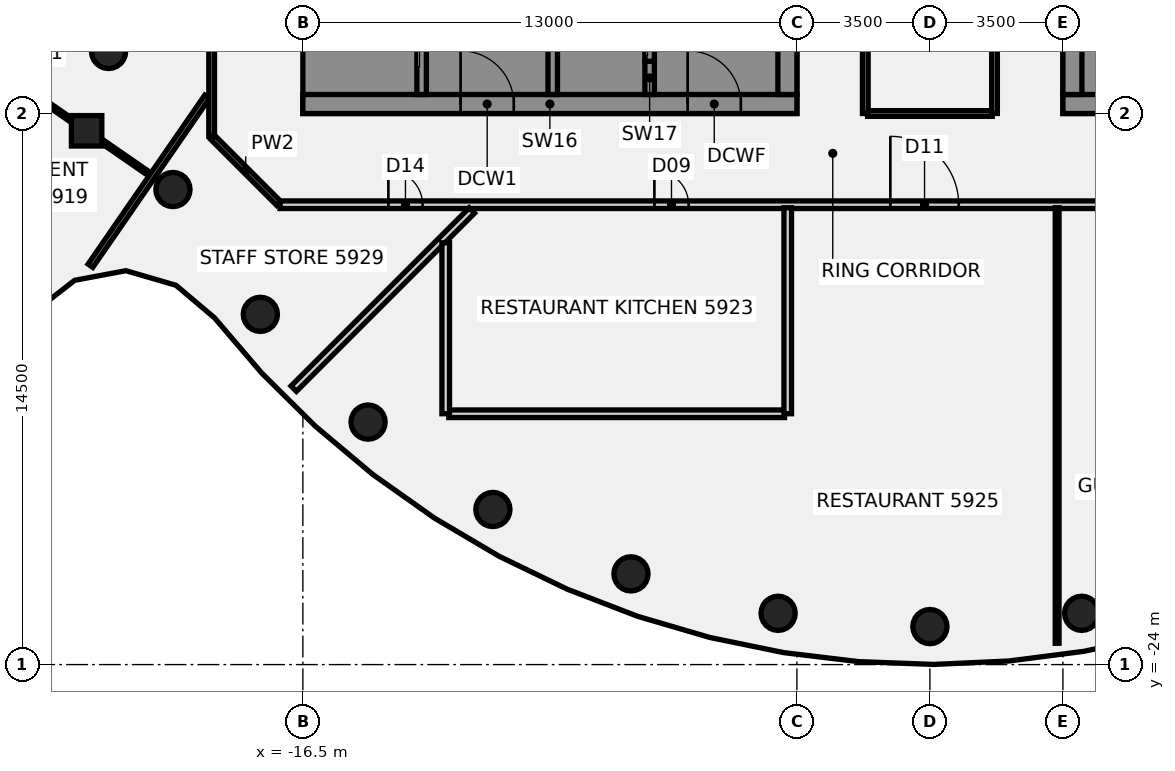
"""IFC4 building model, lengths in metres.
Left out: names, types, materials, properties, quantities, classifications, styles, units other than length and angle.
Written with IfcOpenShell. Run it as: python <this file> out.ifc"""

import sys

from ifc_helpers import new_model, si_unit, direction, frame, frame_2d, origin, origin_2d, place, context, subcontext, project, spatial, polyline, rectangle, circle, outline, extrude, element, fill, save


model = new_model("IFC4")
c1 = context("Model", 3, precision=1e-05, world=origin(), true_north=direction((0.0, 1.0)))
c2 = subcontext(c1, "Body", "Model", "MODEL_VIEW")
j1 = project(units=[si_unit("LENGTHUNIT", "METRE"), si_unit("PLANEANGLEUNIT", "RADIAN")], contexts=[c1])
p1 = place(None, origin())
s1 = spatial("IfcSite", under=j1, at=p1, CompositionType="ELEMENT")
p2 = place(p1, origin())
s2 = spatial("IfcBuilding", under=s1, at=p2, CompositionType="ELEMENT")
p3 = place(p2, frame((0.0, 0.0, 234.3)))
s3 = spatial("IfcBuildingStorey", under=s2, at=p3, CompositionType="ELEMENT", Elevation=234.3)
for number, where, z_axis, x_axis in (
    (1, (-21.613, -7.866, -0.14), (0.0, 0.0, 1.0), (1.0, 0.0, 0.0)),
    (2, (-19.919, -11.5, -0.14), (0.0, 0.0, 1.0), (1.0, 0.0, 0.0)),
    (3, (-17.619, -14.784, -0.14), (0.0, 0.0, 1.0), (1.0, 0.0, 0.0)),
    (4, (-14.784, -17.619, -0.14), (0.0, 0.0, 1.0), (1.0, 0.0, 0.0)),
    (5, (-11.5, -19.919, -0.14), (0.0, 0.0, 1.0), (1.0, 0.0, 0.0)),
    (6, (-7.866, -21.613, -0.14), (0.0, 0.0, 1.0), (1.0, 0.0, 0.0)),
    (7, (-3.994, -22.651, -0.14), (0.0, 0.0, 1.0), (1.0, 0.0, 0.0)),
    (8, (0.0, -23.0, -0.14), (0.0, 0.0, 1.0), (1.0, 0.0, 0.0)),
    (9, (3.994, -22.651, -0.14), (0.0, 0.0, 1.0), (1.0, 0.0, 0.0)),
):
    element("IfcColumn", number, at=place(p3, frame(where, z_axis=z_axis, x_axis=x_axis)), inside=s3, PredefinedType="COLUMN", context=c2, shape_type="SweptSolid", body=[
        extrude(circle(Radius=0.45, at=origin_2d()), origin(), (0.0, 0.0, 1.0), 3.6),
    ])
p4 = place(p3, frame((-22.19, -9.955, -0.139), z_axis=(0.050356763522, -0.000474424421, 0.998731180693), x_axis=(-0.822157981301, 0.5677282831, 0.041723498785)))
e10 = element("IfcColumn", 10, at=p4, inside=s3, PredefinedType="COLUMN", context=c2, shape_type="SweptSolid", body=[
    extrude(rectangle(XDim=0.8, YDim=0.8, at=origin_2d()), origin(), (0.0, 0.0, 1.0), 3.602),
])
p5 = place(p3, frame((-18.872, -10.128, 0.0), z_axis=(0.0, 0.0, 1.0), x_axis=(0.707106781187, -0.707106781187, 0.0)))
e11 = element("IfcWall", 11, at=p5, inside=s3, PredefinedType="PARTITIONING", context=c2, shape_type="SweptSolid", body=[
    extrude(rectangle(XDim=2.455, YDim=0.15, at=frame_2d((1.228, 0.0))), origin(), (0.0, 0.0, 1.0), 2.864),
])
p6 = place(p3, frame((-25.667, -7.555, 0.0), z_axis=(0.0, 0.0, 1.0), x_axis=(0.822953879719, -0.568108186753, 0.0)))
e12 = element("IfcWall", 12, at=p6, inside=s3, PredefinedType="PARTITIONING", context=c2, shape_type="SweptSolid", body=[
    extrude(rectangle(XDim=3.816, YDim=0.1, at=frame_2d((1.908, 0.0))), origin(), (0.0, 0.0, 1.0), 2.864),
])
p7 = place(p3, frame((-21.74, -10.266, 0.0), z_axis=(0.0, 0.0, 1.0), x_axis=(0.822970451854, -0.568084179832, 0.0)))
e13 = element("IfcWall", 13, at=p7, inside=s3, PredefinedType="PARTITIONING", context=c2, shape_type="SweptSolid", body=[
    extrude(rectangle(XDim=1.478, YDim=0.1, at=frame_2d((0.739, 0.0))), origin(), (0.0, 0.0, 1.0), 2.864),
])
p8 = place(p3, frame((-17.1, -11.9, 0.0), z_axis=(0.0, 0.0, 1.0), x_axis=(1.0, 0.0, 0.0)))
e14 = element("IfcWall", 14, at=p8, inside=s3, PredefinedType="PARTITIONING", context=c2, shape_type="SweptSolid", body=[
    extrude(rectangle(XDim=34.165, YDim=0.2, at=frame_2d((17.083, 0.0))), origin(), (0.0, 0.0, 1.0), 2.864),
])
p9 = place(p8, frame((9.85, 0.0, 0.0)))
e15 = element("IfcOpeningElement", 15, at=p9, cuts=e14, PredefinedType="OPENING", context=c2, shape_type="SweptSolid", body=[
    extrude(rectangle(XDim=0.9, YDim=2.1, at=frame_2d((0.45, 1.05))), frame((0.0, 0.11, 0.0), z_axis=(0.0, -1.0, 0.0), x_axis=(1.0, 0.0, 0.0)), (0.0, 0.0, 1.0), 0.22),
])
p10 = place(p8, frame((26.941, 0.0, 0.0)))
e16 = element("IfcOpeningElement", 16, at=p10, cuts=e14, PredefinedType="OPENING", context=c2, shape_type="SweptSolid", body=[
    extrude(rectangle(XDim=0.9, YDim=2.1, at=frame_2d((0.45, 1.05))), frame((0.0, 0.11, 0.0), z_axis=(0.0, -1.0, 0.0), x_axis=(1.0, 0.0, 0.0)), (0.0, 0.0, 1.0), 0.22),
])
p11 = place(p8, frame((16.059, 0.0, 0.0)))
e17 = element("IfcOpeningElement", 17, at=p11, cuts=e14, PredefinedType="OPENING", context=c2, shape_type="SweptSolid", body=[
    extrude(rectangle(XDim=1.8, YDim=2.1, at=frame_2d((0.9, 1.05))), frame((0.0, 0.11, 0.0), z_axis=(0.0, -1.0, 0.0), x_axis=(1.0, 0.0, 0.0)), (0.0, 0.0, 1.0), 0.22),
])
p12 = place(p8, frame((22.548, 0.0, 0.0)))
e18 = element("IfcOpeningElement", 18, at=p12, cuts=e14, PredefinedType="OPENING", context=c2, shape_type="SweptSolid", body=[
    extrude(rectangle(XDim=1.8, YDim=2.1, at=frame_2d((0.9, 1.05))), frame((0.0, 0.11, 0.0), z_axis=(0.0, -1.0, 0.0), x_axis=(1.0, 0.0, 0.0)), (0.0, 0.0, 1.0), 0.22),
])
p13 = place(p8, frame((31.7, 0.0, 0.0)))
e19 = element("IfcOpeningElement", 19, at=p13, cuts=e14, PredefinedType="OPENING", context=c2, shape_type="SweptSolid", body=[
    extrude(rectangle(XDim=0.9, YDim=2.1, at=frame_2d((0.45, 1.05))), frame((0.0, 0.11, 0.0), z_axis=(0.0, -1.0, 0.0), x_axis=(1.0, 0.0, 0.0)), (0.0, 0.0, 1.0), 0.22),
])
p14 = place(p8, frame((2.85, 0.0, 0.0)))
e20 = element("IfcOpeningElement", 20, at=p14, cuts=e14, PredefinedType="OPENING", context=c2, shape_type="SweptSolid", body=[
    extrude(rectangle(XDim=0.9, YDim=2.1, at=frame_2d((0.45, 1.05))), frame((0.0, 0.11, 0.0), z_axis=(0.0, -1.0, 0.0), x_axis=(1.0, 0.0, 0.0)), (0.0, 0.0, 1.0), 0.22),
])
p15 = place(p3, frame((-12.661, -17.4, 0.0), z_axis=(0.0, 0.0, 1.0), x_axis=(1.0, 0.0, 0.0)))
e21 = element("IfcWall", 21, at=p15, inside=s3, PredefinedType="PARTITIONING", context=c2, shape_type="SweptSolid", body=[
    extrude(rectangle(XDim=8.835, YDim=0.2, at=frame_2d((4.417, 0.0))), origin(), (0.0, 0.0, 1.0), 2.864),
])
p16 = place(p3, frame((-1.64, -9.5, 0.0), z_axis=(0.0, 0.0, 1.0), x_axis=(1.0, 0.0, 0.0)))
e22 = element("IfcWall", 22, at=p16, inside=s3, PredefinedType="PARTITIONING", context=c2, shape_type="SweptSolid", body=[
    extrude(rectangle(XDim=3.28, YDim=0.15, at=frame_2d((1.64, 0.0))), origin(), (0.0, 0.0, 1.0), 2.864),
])
p17 = place(p3, frame((-16.74, -16.74, 0.0), z_axis=(0.0, 0.0, 1.0), x_axis=(0.707106781187, 0.707106781187, 0.0)))
e23 = element("IfcWall", 23, at=p17, inside=s3, PredefinedType="PARTITIONING", context=c2, shape_type="SweptSolid", body=[
    extrude(rectangle(XDim=6.631, YDim=0.2, at=frame_2d((3.315, 0.0))), origin(), (0.0, 0.0, 1.0), 2.864),
])
p18 = place(p3, frame((-22.09, -13.505, 0.0), z_axis=(0.0, 0.0, 1.0), x_axis=(0.568201643827, 0.822889355838, 0.0)))
e24 = element("IfcWall", 24, at=p18, inside=s3, PredefinedType="PARTITIONING", context=c2, shape_type="SweptSolid", body=[
    extrude(rectangle(XDim=5.404, YDim=0.15, at=frame_2d((2.702, 0.0))), origin(), (0.0, 0.0, 1.0), 2.864),
])
p19 = place(p3, frame((-18.9, -10.1, 0.0), z_axis=(0.0, 0.0, 1.0), x_axis=(0.0, 1.0, 0.0)))
e25 = element("IfcWall", 25, at=p19, inside=s3, PredefinedType="PARTITIONING", context=c2, shape_type="SweptSolid", body=[
    extrude(rectangle(XDim=20.2, YDim=0.15, at=frame_2d((10.1, 0.0))), origin(), (0.0, 0.0, 1.0), 2.864),
])
p20 = place(p19, frame((13.124, 0.0, 0.0)))
e26 = element("IfcOpeningElement", 26, at=p20, cuts=e25, PredefinedType="OPENING", context=c2, shape_type="SweptSolid", body=[
    extrude(rectangle(XDim=1.8, YDim=2.1, at=frame_2d((0.9, 1.05))), frame((0.0, 0.085, 0.0), z_axis=(0.0, -1.0, 0.0), x_axis=(1.0, 0.0, 0.0)), (0.0, 0.0, 1.0), 0.17),
])
p21 = place(p19, frame((8.291, 0.0, 0.0)))
e27 = element("IfcOpeningElement", 27, at=p21, cuts=e25, PredefinedType="OPENING", context=c2, shape_type="SweptSolid", body=[
    extrude(rectangle(XDim=0.9, YDim=2.1, at=frame_2d((0.45, 1.05))), frame((0.0, 0.085, 0.0), z_axis=(0.0, -1.0, 0.0), x_axis=(1.0, 0.0, 0.0)), (0.0, 0.0, 1.0), 0.17),
])
p22 = place(p3, frame((-12.741, -17.4, 0.0), z_axis=(0.0, 0.0, 1.0), x_axis=(0.0, 1.0, 0.0)))
e28 = element("IfcWall", 28, at=p22, inside=s3, PredefinedType="PARTITIONING", context=c2, shape_type="SweptSolid", body=[
    extrude(rectangle(XDim=4.499, YDim=0.2, at=frame_2d((2.25, 0.0))), origin(), (0.0, 0.0, 1.0), 2.864),
])
p23 = place(p3, frame((-3.741, -17.4, 0.0), z_axis=(0.0, 0.0, 1.0), x_axis=(0.0, 1.0, 0.0)))
e29 = element("IfcWall", 29, at=p23, inside=s3, PredefinedType="PARTITIONING", context=c2, shape_type="SweptSolid", body=[
    extrude(rectangle(XDim=5.42, YDim=0.2, at=frame_2d((2.71, 0.0))), origin(), (0.0, 0.0, 1.0), 2.864),
])
p24 = place(p3, frame((-1.7, -9.5, 0.0), z_axis=(0.0, 0.0, 1.0), x_axis=(0.0, 1.0, 0.0)))
e30 = element("IfcWall", 30, at=p24, inside=s3, PredefinedType="PARTITIONING", context=c2, shape_type="SweptSolid", body=[
    extrude(rectangle(XDim=19.0, YDim=0.15, at=frame_2d((9.5, 0.0))), origin(), (0.0, 0.0, 1.0), 2.864),
])
p25 = place(p24, frame((6.3, 0.0, 0.0)))
e31 = element("IfcOpeningElement", 31, at=p25, cuts=e30, PredefinedType="OPENING", context=c2, shape_type="SweptSolid", body=[
    extrude(rectangle(XDim=1.8, YDim=2.1, at=frame_2d((0.9, 1.05))), frame((0.0, 0.085, 0.0), z_axis=(0.0, -1.0, 0.0), x_axis=(1.0, 0.0, 0.0)), (0.0, 0.0, 1.0), 0.17),
])
p26 = place(p24, frame((13.45, 0.0, 0.0)))
e32 = element("IfcOpeningElement", 32, at=p26, cuts=e30, PredefinedType="OPENING", context=c2, shape_type="SweptSolid", body=[
    extrude(rectangle(XDim=1.8, YDim=2.1, at=frame_2d((0.9, 1.05))), frame((0.0, 0.085, 0.0), z_axis=(0.0, -1.0, 0.0), x_axis=(1.0, 0.0, 0.0)), (0.0, 0.0, 1.0), 0.17),
])
p27 = place(p3, frame((1.7, -9.5, 0.0), z_axis=(0.0, 0.0, 1.0), x_axis=(0.0, 1.0, 0.0)))
e33 = element("IfcWall", 33, at=p27, inside=s3, PredefinedType="PARTITIONING", context=c2, shape_type="SweptSolid", body=[
    extrude(rectangle(XDim=19.0, YDim=0.15, at=frame_2d((9.5, 0.0))), origin(), (0.0, 0.0, 1.0), 2.864),
])
p28 = place(p3, frame((3.348, -23.439, 0.0), z_axis=(0.0, 0.0, 1.0), x_axis=(0.0, 1.0, 0.0)))
e34 = element("IfcWall", 34, at=p28, inside=s3, PredefinedType="PARTITIONING", context=c2, shape_type="SweptSolid", body=[
    extrude(rectangle(XDim=11.459, YDim=0.1, at=frame_2d((5.729, 0.0))), origin(), (0.0, 0.0, 1.0), 2.864),
])
p29 = place(p3, frame((-16.5, -9.25, 0.0), z_axis=(0.0, 0.0, 1.0), x_axis=(1.0, 0.0, 0.0)))
e35 = element("IfcWall", 35, at=p29, inside=s3, PredefinedType="SHEAR", context=c2, shape_type="SweptSolid", body=[
    extrude(rectangle(XDim=13.0, YDim=0.5, at=frame_2d((6.5, 0.0))), origin(), (0.0, 0.0, 1.0), 3.46),
])
p30 = place(p29, frame((4.15, 0.0, 0.0)))
e36 = element("IfcOpeningElement", 36, at=p30, cuts=e35, PredefinedType="OPENING", context=c2, shape_type="SweptSolid", body=[
    extrude(rectangle(XDim=1.4, YDim=2.1, at=frame_2d((0.7, 1.05))), frame((0.0, 0.26, 0.0), z_axis=(0.0, -1.0, 0.0), x_axis=(1.0, 0.0, 0.0)), (0.0, 0.0, 1.0), 0.52),
])
p31 = place(p29, frame((10.125, 0.0, 0.0)))
e37 = element("IfcOpeningElement", 37, at=p31, cuts=e35, PredefinedType="OPENING", context=c2, shape_type="SweptSolid", body=[
    extrude(rectangle(XDim=1.4, YDim=2.1, at=frame_2d((0.7, 1.05))), frame((0.0, 0.26, 0.0), z_axis=(0.0, -1.0, 0.0), x_axis=(1.0, 0.0, 0.0)), (0.0, 0.0, 1.0), 0.52),
])
p32 = place(p3, origin())
e38 = element("IfcWall", 38, at=p32, inside=s3, PredefinedType="SHEAR", context=c2, shape_type="SweptSolid", body=[
    extrude(outline(polyline([(-13.5, -8.125), (-16.0, -8.125), (-16.0, -5.625), (-13.5, -5.625), (-13.5, -5.375), (-16.0, -5.375), (-16.0, 5.375), (-13.5, 5.375), (-13.5, 5.625), (-16.0, 5.625), (-16.0, 8.125), (-13.5, 8.125), (-13.5, 9.0), (-16.0, 9.0), (-16.5, 9.0), (-16.5, -9.0), (-16.0, -9.0), (-13.5, -9.0), (-13.5, -8.125)])), origin(), (0.0, 0.0, 1.0), 3.46),
])
p33 = place(p3, origin())
e39 = element("IfcWall", 39, at=p33, inside=s3, PredefinedType="SHEAR", context=c2, shape_type="SweptSolid", body=[
    extrude(outline(polyline([(-7.5, -8.125), (-9.55, -8.125), (-9.55, -5.625), (-9.8, -5.625), (-9.8, -8.125), (-9.8, -9.0), (-7.5, -9.0), (-7.5, -8.125)])), origin(), (0.0, 0.0, 1.0), 3.46),
])
p34 = place(p3, frame((-7.375, -9.0, 0.0), z_axis=(0.0, 0.0, 1.0), x_axis=(0.0, 1.0, 0.0)))
e40 = element("IfcWall", 40, at=p34, inside=s3, PredefinedType="SHEAR", context=c2, shape_type="SweptSolid", body=[
    extrude(rectangle(XDim=0.875, YDim=0.25, at=frame_2d((0.438, 0.0))), origin(), (0.0, 0.0, 1.0), 3.46),
])
p35 = place(p3, frame((-13.375, -9.0, 0.0), z_axis=(0.0, 0.0, 1.0), x_axis=(0.0, 1.0, 0.0)))
e41 = element("IfcWall", 41, at=p35, inside=s3, PredefinedType="SHEAR", context=c2, shape_type="SweptSolid", body=[
    extrude(rectangle(XDim=18.0, YDim=0.25, at=frame_2d((9.0, 0.0))), origin(), (0.0, 0.0, 1.0), 3.46),
])
p36 = place(p35, frame((1.425, 0.0, 0.0)))
e42 = element("IfcOpeningElement", 42, at=p36, cuts=e41, PredefinedType="OPENING", context=c2, shape_type="SweptSolid", body=[
    extrude(rectangle(XDim=1.4, YDim=2.1, at=frame_2d((0.7, 1.05))), frame((0.0, 0.135, 0.0), z_axis=(0.0, -1.0, 0.0), x_axis=(1.0, 0.0, 0.0)), (0.0, 0.0, 1.0), 0.27),
])
p37 = place(p35, frame((8.5, 0.0, 0.0)))
e43 = element("IfcOpeningElement", 43, at=p37, cuts=e41, PredefinedType="OPENING", context=c2, shape_type="SweptSolid", body=[
    extrude(rectangle(XDim=1.0, YDim=2.1, at=frame_2d((0.5, 1.05))), frame((0.0, 0.135, 0.0), z_axis=(0.0, -1.0, 0.0), x_axis=(1.0, 0.0, 0.0)), (0.0, 0.0, 1.0), 0.27),
])
p38 = place(p3, frame((-9.925, -9.0, 0.0), z_axis=(0.0, 0.0, 1.0), x_axis=(0.0, 1.0, 0.0)))
e44 = element("IfcWall", 44, at=p38, inside=s3, PredefinedType="SHEAR", context=c2, shape_type="SweptSolid", body=[
    extrude(rectangle(XDim=18.0, YDim=0.25, at=frame_2d((9.0, 0.0))), origin(), (0.0, 0.0, 1.0), 3.46),
])
p39 = place(p38, frame((12.575, 0.0, 0.0)))
e45 = element("IfcOpeningElement", 45, at=p39, cuts=e44, PredefinedType="OPENING", context=c2, shape_type="SweptSolid", body=[
    extrude(rectangle(XDim=1.1, YDim=2.1, at=frame_2d((0.55, 1.05))), frame((0.0, 0.135, 0.0), z_axis=(0.0, -1.0, 0.0), x_axis=(1.0, 0.0, 0.0)), (0.0, 0.0, 1.0), 0.27),
])
p40 = place(p38, frame((15.325, 0.0, 0.0)))
e46 = element("IfcOpeningElement", 46, at=p40, cuts=e44, PredefinedType="OPENING", context=c2, shape_type="SweptSolid", body=[
    extrude(rectangle(XDim=1.1, YDim=2.1, at=frame_2d((0.55, 1.05))), frame((0.0, 0.135, 0.0), z_axis=(0.0, -1.0, 0.0), x_axis=(1.0, 0.0, 0.0)), (0.0, 0.0, 1.0), 0.27),
])
p41 = place(p38, frame((3.938, 0.0, 0.0)))
e47 = element("IfcOpeningElement", 47, at=p41, cuts=e44, PredefinedType="OPENING", context=c2, shape_type="SweptSolid", body=[
    extrude(rectangle(XDim=1.0, YDim=2.1, at=frame_2d((0.5, 1.05))), frame((0.0, 0.135, 0.0), z_axis=(0.0, -1.0, 0.0), x_axis=(1.0, 0.0, 0.0)), (0.0, 0.0, 1.0), 0.27),
])
p42 = place(p38, frame((6.688, 0.0, 0.0)))
e48 = element("IfcOpeningElement", 48, at=p42, cuts=e44, PredefinedType="OPENING", context=c2, shape_type="SweptSolid", body=[
    extrude(rectangle(XDim=1.0, YDim=2.1, at=frame_2d((0.5, 1.05))), frame((0.0, 0.135, 0.0), z_axis=(0.0, -1.0, 0.0), x_axis=(1.0, 0.0, 0.0)), (0.0, 0.0, 1.0), 0.27),
])
p43 = place(p38, frame((9.875, 0.0, 0.0)))
e49 = element("IfcOpeningElement", 49, at=p43, cuts=e44, PredefinedType="OPENING", context=c2, shape_type="SweptSolid", body=[
    extrude(rectangle(XDim=1.0, YDim=2.1, at=frame_2d((0.5, 1.05))), frame((0.0, 0.135, 0.0), z_axis=(0.0, -1.0, 0.0), x_axis=(1.0, 0.0, 0.0)), (0.0, 0.0, 1.0), 0.27),
])
p44 = place(p3, frame((-7.375, -8.125, 0.0), z_axis=(0.0, 0.0, 1.0), x_axis=(0.0, 1.0, 0.0)))
e50 = element("IfcWall", 50, at=p44, inside=s3, PredefinedType="SHEAR", context=c2, shape_type="SweptSolid", body=[
    extrude(rectangle(XDim=2.5, YDim=0.25, at=frame_2d((1.25, 0.0))), origin(), (0.0, 0.0, 1.0), 3.46),
])
p45 = place(p44, frame((0.7, 0.0, 0.0)))
e51 = element("IfcOpeningElement", 51, at=p45, cuts=e50, PredefinedType="OPENING", context=c2, shape_type="SweptSolid", body=[
    extrude(rectangle(XDim=1.1, YDim=2.1, at=frame_2d((0.55, 1.05))), frame((0.0, 0.135, 0.0), z_axis=(0.0, -1.0, 0.0), x_axis=(1.0, 0.0, 0.0)), (0.0, 0.0, 1.0), 0.27),
])
p46 = place(p3, frame((-3.75, -9.0, 0.0), z_axis=(0.0, 0.0, 1.0), x_axis=(0.0, 1.0, 0.0)))
e52 = element("IfcWall", 52, at=p46, inside=s3, PredefinedType="SHEAR", context=c2, shape_type="SweptSolid", body=[
    extrude(rectangle(XDim=18.0, YDim=0.5, at=frame_2d((9.0, 0.0))), origin(), (0.0, 0.0, 1.0), 3.46),
])
p47 = place(p46, frame((1.35, 0.0, 0.0)))
e53 = element("IfcOpeningElement", 53, at=p47, cuts=e52, PredefinedType="OPENING", context=c2, shape_type="SweptSolid", body=[
    extrude(rectangle(XDim=1.8, YDim=2.1, at=frame_2d((0.9, 1.05))), frame((0.0, 0.26, 0.0), z_axis=(0.0, -1.0, 0.0), x_axis=(1.0, 0.0, 0.0)), (0.0, 0.0, 1.0), 0.52),
])
p48 = place(p46, frame((12.75, 0.0, 0.0)))
e54 = element("IfcOpeningElement", 54, at=p48, cuts=e52, PredefinedType="OPENING", context=c2, shape_type="SweptSolid", body=[
    extrude(rectangle(XDim=1.0, YDim=2.1, at=frame_2d((0.5, 1.05))), frame((0.0, 0.26, 0.0), z_axis=(0.0, -1.0, 0.0), x_axis=(1.0, 0.0, 0.0)), (0.0, 0.0, 1.0), 0.52),
])
p49 = place(p46, frame((16.274, 0.0, 0.0)))
e55 = element("IfcOpeningElement", 55, at=p49, cuts=e52, PredefinedType="OPENING", context=c2, shape_type="SweptSolid", body=[
    extrude(rectangle(XDim=1.0, YDim=2.1, at=frame_2d((0.5, 1.05))), frame((0.0, 0.26, 0.0), z_axis=(0.0, -1.0, 0.0), x_axis=(1.0, 0.0, 0.0)), (0.0, 0.0, 1.0), 0.52),
])
p50 = place(p3, frame((16.5, -9.25, 0.0), z_axis=(0.0, 0.0, 1.0), x_axis=(-1.0, 0.0, 0.0)))
e56 = element("IfcWall", 56, at=p50, inside=s3, PredefinedType="SHEAR", context=c2, shape_type="SweptSolid", body=[
    extrude(rectangle(XDim=13.0, YDim=0.5, at=frame_2d((6.5, 0.0))), origin(), (0.0, 0.0, 1.0), 3.46),
])
p51 = place(p50, frame((4.15, 0.0, 0.0)))
e57 = element("IfcOpeningElement", 57, at=p51, cuts=e56, PredefinedType="OPENING", context=c2, shape_type="SweptSolid", body=[
    extrude(rectangle(XDim=1.4, YDim=2.1, at=frame_2d((0.7, 1.05))), frame((0.0, 0.26, 0.0), z_axis=(0.0, -1.0, 0.0), x_axis=(1.0, 0.0, 0.0)), (0.0, 0.0, 1.0), 0.52),
])
p52 = place(p50, frame((10.125, 0.0, 0.0)))
e58 = element("IfcOpeningElement", 58, at=p52, cuts=e56, PredefinedType="OPENING", context=c2, shape_type="SweptSolid", body=[
    extrude(rectangle(XDim=1.4, YDim=2.1, at=frame_2d((0.7, 1.05))), frame((0.0, 0.26, 0.0), z_axis=(0.0, -1.0, 0.0), x_axis=(1.0, 0.0, 0.0)), (0.0, 0.0, 1.0), 0.52),
])
p53 = place(p3, frame((3.75, -9.0, 0.0), z_axis=(0.0, 0.0, 1.0), x_axis=(0.0, 1.0, 0.0)))
e59 = element("IfcWall", 59, at=p53, inside=s3, PredefinedType="SHEAR", context=c2, shape_type="SweptSolid", body=[
    extrude(rectangle(XDim=18.0, YDim=0.5, at=frame_2d((9.0, 0.0))), origin(), (0.0, 0.0, 1.0), 3.46),
])
p54 = place(p53, frame((1.35, 0.0, 0.0)))
e60 = element("IfcOpeningElement", 60, at=p54, cuts=e59, PredefinedType="OPENING", context=c2, shape_type="SweptSolid", body=[
    extrude(rectangle(XDim=1.8, YDim=2.1, at=frame_2d((0.9, 1.05))), frame((0.0, 0.26, 0.0), z_axis=(0.0, -1.0, 0.0), x_axis=(1.0, 0.0, 0.0)), (0.0, 0.0, 1.0), 0.52),
])
p55 = place(p53, frame((12.75, 0.0, 0.0)))
e61 = element("IfcOpeningElement", 61, at=p55, cuts=e59, PredefinedType="OPENING", context=c2, shape_type="SweptSolid", body=[
    extrude(rectangle(XDim=1.0, YDim=2.1, at=frame_2d((0.5, 1.05))), frame((0.0, 0.26, 0.0), z_axis=(0.0, -1.0, 0.0), x_axis=(1.0, 0.0, 0.0)), (0.0, 0.0, 1.0), 0.52),
])
p56 = place(p53, frame((16.274, 0.0, 0.0)))
e62 = element("IfcOpeningElement", 62, at=p56, cuts=e59, PredefinedType="OPENING", context=c2, shape_type="SweptSolid", body=[
    extrude(rectangle(XDim=1.0, YDim=2.1, at=frame_2d((0.5, 1.05))), frame((0.0, 0.26, 0.0), z_axis=(0.0, -1.0, 0.0), x_axis=(1.0, 0.0, 0.0)), (0.0, 0.0, 1.0), 0.52),
])
p57 = place(p9, frame((0.9, 0.0, 0.0), z_axis=(0.0, 0.0, 1.0), x_axis=(-1.0, 0.0, 0.0)))
e63 = element("IfcDoor", 63, at=p57, inside=s3, OperationType="SINGLE_SWING_LEFT", PredefinedType="DOOR", context=c2, shape_type="SweptSolid", body=[
    extrude(rectangle(XDim=0.9, YDim=2.1, at=frame_2d((0.45, 1.05))), frame((0.0, 0.025, 0.0), z_axis=(0.0, -1.0, 0.0), x_axis=(1.0, 0.0, 0.0)), (0.0, 0.0, 1.0), 0.05),
])
fill(e15, e63)
p58 = place(p11, origin())
e64 = element("IfcDoor", 64, at=p58, inside=s3, OperationType="DOUBLE_DOOR_SINGLE_SWING", PredefinedType="DOOR", context=c2, shape_type="SweptSolid", body=[
    extrude(rectangle(XDim=1.8, YDim=2.1, at=frame_2d((0.9, 1.05))), frame((0.0, 0.025, 0.0), z_axis=(0.0, -1.0, 0.0), x_axis=(1.0, 0.0, 0.0)), (0.0, 0.0, 1.0), 0.05),
])
fill(e17, e64)
p59 = place(p14, frame((0.9, 0.0, 0.0), z_axis=(0.0, 0.0, 1.0), x_axis=(-1.0, 0.0, 0.0)))
e65 = element("IfcDoor", 65, at=p59, inside=s3, OperationType="SINGLE_SWING_LEFT", PredefinedType="DOOR", context=c2, shape_type="SweptSolid", body=[
    extrude(rectangle(XDim=0.9, YDim=2.1, at=frame_2d((0.45, 1.05))), frame((0.0, 0.025, 0.0), z_axis=(0.0, -1.0, 0.0), x_axis=(1.0, 0.0, 0.0)), (0.0, 0.0, 1.0), 0.05),
])
fill(e20, e65)
p60 = place(p30, origin())
e66 = element("IfcDoor", 66, at=p60, inside=s3, OperationType="SINGLE_SWING_LEFT", PredefinedType="DOOR", context=c2, shape_type="SweptSolid", body=[
    extrude(rectangle(XDim=1.4, YDim=2.1, at=frame_2d((0.7, 1.05))), frame((0.0, 0.025, 0.0), z_axis=(0.0, -1.0, 0.0), x_axis=(1.0, 0.0, 0.0)), (0.0, 0.0, 1.0), 0.05),
])
fill(e36, e66)
p61 = place(p31, origin())
e67 = element("IfcDoor", 67, at=p61, inside=s3, OperationType="SINGLE_SWING_LEFT", PredefinedType="DOOR", context=c2, shape_type="SweptSolid", body=[
    extrude(rectangle(XDim=1.4, YDim=2.1, at=frame_2d((0.7, 1.05))), frame((0.0, 0.025, 0.0), z_axis=(0.0, -1.0, 0.0), x_axis=(1.0, 0.0, 0.0)), (0.0, 0.0, 1.0), 0.05),
])
fill(e37, e67)
save(model, sys.argv[1])
